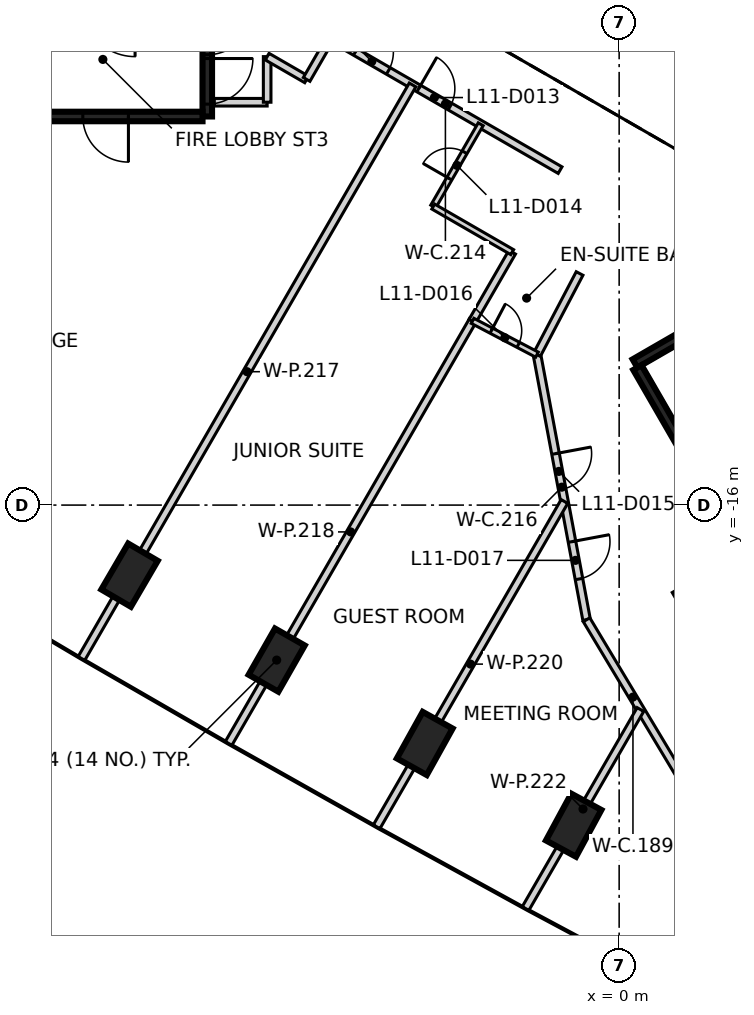
"""IFC4 building model, lengths in metres.
Left out: names, types, materials, properties, quantities, classifications, styles, units other than length and angle.
Written with IfcOpenShell. Run it as: python <this file> out.ifc"""

import sys

from ifc_helpers import new_model, si_unit, direction, frame, frame_2d, origin, origin_2d, place, context, subcontext, project, spatial, rectangle, extrude, element, fill, save


model = new_model("IFC4")
c1 = context("Model", 3, precision=1e-05, world=origin(), true_north=direction((0.0, 1.0)))
c2 = subcontext(c1, "Body", "Model", "MODEL_VIEW")
j1 = project(units=[si_unit("LENGTHUNIT", "METRE"), si_unit("PLANEANGLEUNIT", "RADIAN")], contexts=[c1])
p1 = place(None, origin())
s1 = spatial("IfcSite", under=j1, at=p1, CompositionType="ELEMENT")
p2 = place(p1, origin())
s2 = spatial("IfcBuilding", under=s1, at=p2, CompositionType="ELEMENT")
p3 = place(p2, frame((0.0, 0.0, 53.0)))
s3 = spatial("IfcBuildingStorey", under=s2, at=p3, CompositionType="ELEMENT", Elevation=53.0)
for number, where, z_axis, x_axis in (
    (1, (-12.883, -17.844, -0.475), (0.0, 0.0, 1.0), (0.505, 0.863, 0.0)),
    (2, (-9.011, -20.079, -0.475), (0.0, 0.0, 1.0), (0.495, 0.869, 0.0)),
    (3, (-5.116, -22.272, -0.475), (0.0, 0.0, 1.0), (0.486, 0.874, 0.0)),
    (4, (-1.197, -24.423, -0.475), (0.0, 0.0, 1.0), (0.476, 0.879, 0.0)),
):
    element("IfcColumn", number, at=place(p3, frame(where, z_axis=z_axis, x_axis=x_axis)), inside=s3, PredefinedType="COLUMN", context=c2, shape_type="SweptSolid", body=[
        extrude(rectangle(XDim=1.4, YDim=0.9, at=origin_2d()), origin(), (0.0, 0.0, 1.0), 3.6),
    ])
p4 = place(p3, frame((-10.837, 5.775, 0.0), z_axis=(0.0, 0.0, 1.0), x_axis=(0.0, -1.0, 0.0)))
e5 = element("IfcWall", 5, at=p4, inside=s3, PredefinedType="SHEAR", context=c2, shape_type="SweptSolid", body=[
    extrude(rectangle(XDim=11.55, YDim=0.25, at=frame_2d((5.775, 0.0))), origin(), (0.0, 0.0, 1.0), 3.125),
])
p5 = place(p4, frame((10.025, 0.0, 0.0)))
e6 = element("IfcOpeningElement", 6, at=p5, cuts=e5, PredefinedType="OPENING", context=c2, shape_type="SweptSolid", body=[
    extrude(rectangle(XDim=1.2, YDim=2.1, at=frame_2d((0.6, 1.05))), frame((0.0, 0.135, 0.0), z_axis=(0.0, -1.0, 0.0), x_axis=(1.0, 0.0, 0.0)), (0.0, 0.0, 1.0), 0.27),
])
p6 = place(p4, frame((8.725, 0.0, 0.0)))
e7 = element("IfcOpeningElement", 7, at=p6, cuts=e5, PredefinedType="OPENING", context=c2, shape_type="SweptSolid", body=[
    extrude(rectangle(XDim=1.2, YDim=2.1, at=frame_2d((0.6, 1.05))), frame((0.0, 0.135, 0.0), z_axis=(0.0, -1.0, 0.0), x_axis=(1.0, 0.0, 0.0)), (0.0, 0.0, 1.0), 0.27),
])
p7 = place(p3, frame((-10.963, -5.775, 0.0), z_axis=(0.0, 0.0, 1.0), x_axis=(-1.0, 0.0, 0.0)))
e8 = element("IfcWall", 8, at=p7, inside=s3, PredefinedType="SHEAR", context=c2, shape_type="SweptSolid", body=[
    extrude(rectangle(XDim=5.225, YDim=0.25, at=frame_2d((2.612, 0.0))), origin(), (0.0, 0.0, 1.0), 3.125),
])
p8 = place(p7, frame((1.95, 0.0, 0.0)))
e9 = element("IfcOpeningElement", 9, at=p8, cuts=e8, PredefinedType="OPENING", context=c2, shape_type="SweptSolid", body=[
    extrude(rectangle(XDim=1.2, YDim=2.1, at=frame_2d((0.6, 1.05))), frame((0.0, 0.135, 0.0), z_axis=(0.0, -1.0, 0.0), x_axis=(1.0, 0.0, 0.0)), (0.0, 0.0, 1.0), 0.27),
])
p9 = place(p3, frame((0.417, -12.273, 0.0), z_axis=(0.0, 0.0, 1.0), x_axis=(0.866021906294, 0.500006057782, 0.0)))
e10 = element("IfcWall", 10, at=p9, inside=s3, PredefinedType="SHEAR", context=c2, shape_type="SweptSolid", body=[
    extrude(rectangle(XDim=11.55, YDim=0.25, at=frame_2d((5.775, 0.0))), origin(), (0.0, 0.0, 1.0), 3.125),
])
p10 = place(p9, frame((10.025, 0.0, 0.0)))
e11 = element("IfcOpeningElement", 11, at=p10, cuts=e10, PredefinedType="OPENING", context=c2, shape_type="SweptSolid", body=[
    extrude(rectangle(XDim=1.2, YDim=2.1, at=frame_2d((0.6, 1.05))), frame((0.0, 0.135, 0.0), z_axis=(0.0, -1.0, 0.0), x_axis=(1.0, 0.0, 0.0)), (0.0, 0.0, 1.0), 0.27),
])
p11 = place(p9, frame((8.725, 0.0, 0.0)))
e12 = element("IfcOpeningElement", 12, at=p11, cuts=e10, PredefinedType="OPENING", context=c2, shape_type="SweptSolid", body=[
    extrude(rectangle(XDim=1.2, YDim=2.1, at=frame_2d((0.6, 1.05))), frame((0.0, 0.135, 0.0), z_axis=(0.0, -1.0, 0.0), x_axis=(1.0, 0.0, 0.0)), (0.0, 0.0, 1.0), 0.27),
])
p12 = place(p3, frame((3.235, -17.153, 0.0), z_axis=(0.0, 0.0, 1.0), x_axis=(-0.500008851346, 0.866020293397, 0.0)))
e13 = element("IfcWall", 13, at=p12, inside=s3, PredefinedType="SHEAR", context=c2, shape_type="SweptSolid", body=[
    extrude(rectangle(XDim=5.51, YDim=0.25, at=frame_2d((2.755, 0.0))), origin(), (0.0, 0.0, 1.0), 3.125),
])
p13 = place(p3, frame((-10.652, -5.4, 0.0), z_axis=(0.0, 0.0, 1.0), x_axis=(1.0, 0.0, 0.0)))
e14 = element("IfcWall", 14, at=p13, inside=s3, PredefinedType="PARTITIONING", context=c2, shape_type="SweptSolid", body=[
    extrude(rectangle(XDim=1.39, YDim=0.2, at=frame_2d((0.695, 0.0))), origin(), (0.0, 0.0, 1.0), 3.125),
])
for number, where, z_axis, x_axis in (
    (15, (-9.262, -5.4, 0.0), (0.0, 0.0, 1.0), (0.0, 1.0, 0.0)),
    (16, (-9.262, -4.2, 0.0), (0.0, 0.0, 1.0), (0.866, -0.5, 0.0)),
):
    element("IfcWall", number, at=place(p3, frame(where, z_axis=z_axis, x_axis=x_axis)), inside=s3, PredefinedType="PARTITIONING", context=c2, shape_type="SweptSolid", body=[
        extrude(rectangle(XDim=1.2, YDim=0.2, at=frame_2d((0.6, 0.0))), origin(), (0.0, 0.0, 1.0), 3.125),
    ])
p14 = place(p3, frame((-8.223, -4.8, 0.0), z_axis=(0.0, 0.0, 1.0), x_axis=(0.499866914522, 0.866102227088, 0.0)))
e17 = element("IfcWall", 17, at=p14, inside=s3, PredefinedType="PARTITIONING", context=c2, shape_type="SweptSolid", body=[
    extrude(rectangle(XDim=1.268, YDim=0.2, at=frame_2d((0.634, 0.0))), origin(), (0.0, 0.0, 1.0), 3.125),
])
p15 = place(p3, frame((-7.589, -3.702, 0.0), z_axis=(0.0, 0.0, 1.0), x_axis=(0.865994210678, -0.500054024153, 0.0)))
e18 = element("IfcWall", 18, at=p15, inside=s3, PredefinedType="PARTITIONING", context=c2, shape_type="SweptSolid", body=[
    extrude(rectangle(XDim=6.969, YDim=0.2, at=frame_2d((3.484, 0.0))), origin(), (0.0, 0.0, 1.0), 3.125),
])
p16 = place(p15, frame((0.749, 0.0, 0.0)))
e19 = element("IfcOpeningElement", 19, at=p16, cuts=e18, PredefinedType="OPENING", context=c2, shape_type="SweptSolid", body=[
    extrude(rectangle(XDim=1.0, YDim=2.1, at=frame_2d((0.5, 1.05))), frame((0.0, 0.11, 0.0), z_axis=(0.0, -1.0, 0.0), x_axis=(1.0, 0.0, 0.0)), (0.0, 0.0, 1.0), 0.22),
])
p17 = place(p15, frame((2.674, 0.0, 0.0)))
e20 = element("IfcOpeningElement", 20, at=p17, cuts=e18, PredefinedType="OPENING", context=c2, shape_type="SweptSolid", body=[
    extrude(rectangle(XDim=0.95, YDim=2.1, at=frame_2d((0.475, 1.05))), frame((0.0, 0.11, 0.0), z_axis=(0.0, -1.0, 0.0), x_axis=(1.0, 0.0, 0.0)), (0.0, 0.0, 1.0), 0.22),
])
p18 = place(p3, frame((-2.162, -12.042, 0.0), z_axis=(0.0, 0.0, 1.0), x_axis=(0.183949825522, -0.982935634561, 0.0)))
e21 = element("IfcWall", 21, at=p18, inside=s3, PredefinedType="PARTITIONING", context=c2, shape_type="SweptSolid", body=[
    extrude(rectangle(XDim=7.094, YDim=0.2, at=frame_2d((3.547, 0.0))), origin(), (0.0, 0.0, 1.0), 3.125),
])
p19 = place(p18, frame((2.65, 0.0, 0.0)))
e22 = element("IfcOpeningElement", 22, at=p19, cuts=e21, PredefinedType="OPENING", context=c2, shape_type="SweptSolid", body=[
    extrude(rectangle(XDim=0.95, YDim=2.1, at=frame_2d((0.475, 1.05))), frame((0.0, 0.11, 0.0), z_axis=(0.0, -1.0, 0.0), x_axis=(1.0, 0.0, 0.0)), (0.0, 0.0, 1.0), 0.22),
])
p20 = place(p18, frame((5.006, 0.0, 0.0)))
e23 = element("IfcOpeningElement", 23, at=p20, cuts=e21, PredefinedType="OPENING", context=c2, shape_type="SweptSolid", body=[
    extrude(rectangle(XDim=1.0, YDim=2.1, at=frame_2d((0.5, 1.05))), frame((0.0, 0.11, 0.0), z_axis=(0.0, -1.0, 0.0), x_axis=(1.0, 0.0, 0.0)), (0.0, 0.0, 1.0), 0.22),
])
p21 = place(p3, frame((-2.162, -12.041, 0.0), z_axis=(0.0, 0.0, 1.0), x_axis=(0.464903343334, 0.885361441083, 0.0)))
e24 = element("IfcWall", 24, at=p21, inside=s3, PredefinedType="PARTITIONING", context=c2, shape_type="SweptSolid", body=[
    extrude(rectangle(XDim=2.411, YDim=0.2, at=frame_2d((1.206, 0.0))), origin(), (0.0, 0.0, 1.0), 3.125),
])
p22 = place(p3, frame((-0.858, -19.017, 0.0), z_axis=(0.0, 0.0, 1.0), x_axis=(0.514647068805, -0.857402119528, 0.0)))
e25 = element("IfcWall", 25, at=p22, inside=s3, PredefinedType="PARTITIONING", context=c2, shape_type="SweptSolid", body=[
    extrude(rectangle(XDim=4.745, YDim=0.2, at=frame_2d((2.373, 0.0))), origin(), (0.0, 0.0, 1.0), 3.125),
])
p23 = place(p3, frame((-14.148, -20.035, 0.0), z_axis=(0.0, 0.0, 1.0), x_axis=(0.499978771293, 0.866037659837, 0.0)))
e26 = element("IfcWall", 26, at=p23, inside=s3, PredefinedType="PARTITIONING", context=c2, shape_type="SweptSolid", body=[
    extrude(rectangle(XDim=17.425, YDim=0.2, at=frame_2d((8.712, 0.0))), origin(), (0.0, 0.0, 1.0), 3.125),
])
p24 = place(p3, frame((-10.276, -22.271, 0.0), z_axis=(0.0, 0.0, 1.0), x_axis=(0.499984478165, 0.866034365135, 0.0)))
e27 = element("IfcWall", 27, at=p24, inside=s3, PredefinedType="PARTITIONING", context=c2, shape_type="SweptSolid", body=[
    extrude(rectangle(XDim=12.851, YDim=0.2, at=frame_2d((6.426, 0.0))), origin(), (0.0, 0.0, 1.0), 3.125),
])
p25 = place(p3, frame((-6.381, -24.464, 0.0), z_axis=(0.0, 0.0, 1.0), x_axis=(0.500007577232, 0.866021029023, 0.0)))
e28 = element("IfcWall", 28, at=p25, inside=s3, PredefinedType="PARTITIONING", context=c2, shape_type="SweptSolid", body=[
    extrude(rectangle(XDim=9.883, YDim=0.2, at=frame_2d((4.941, 0.0))), origin(), (0.0, 0.0, 1.0), 3.125),
])
p26 = place(p3, frame((-3.863, -11.163, 0.0), z_axis=(0.0, 0.0, 1.0), x_axis=(0.499779509621, 0.866152666545, 0.0)))
e29 = element("IfcWall", 29, at=p26, inside=s3, PredefinedType="PARTITIONING", context=c2, shape_type="SweptSolid", body=[
    extrude(rectangle(XDim=2.099, YDim=0.2, at=frame_2d((1.05, 0.0))), origin(), (0.0, 0.0, 1.0), 3.125),
])
p27 = place(p3, frame((-2.462, -26.615, 0.0), z_axis=(0.0, 0.0, 1.0), x_axis=(0.49992636536, 0.86606791259, 0.0)))
e30 = element("IfcWall", 30, at=p27, inside=s3, PredefinedType="PARTITIONING", context=c2, shape_type="SweptSolid", body=[
    extrude(rectangle(XDim=6.046, YDim=0.2, at=frame_2d((3.023, 0.0))), origin(), (0.0, 0.0, 1.0), 3.125),
])
p28 = place(p3, frame((-4.892, -8.145, 0.0), z_axis=(0.0, 0.0, 1.0), x_axis=(0.499711178953, 0.866192090491, 0.0)))
e31 = element("IfcWall", 31, at=p28, inside=s3, PredefinedType="PARTITIONING", context=c2, shape_type="SweptSolid", body=[
    extrude(rectangle(XDim=2.5, YDim=0.15, at=frame_2d((1.25, 0.0))), origin(), (0.0, 0.0, 1.0), 3.125),
])
p29 = place(p28, frame((0.85, 0.0, 0.0)))
e32 = element("IfcOpeningElement", 32, at=p29, cuts=e31, PredefinedType="OPENING", context=c2, shape_type="SweptSolid", body=[
    extrude(rectangle(XDim=0.8, YDim=2.1, at=frame_2d((0.4, 1.05))), frame((0.0, 0.085, 0.0), z_axis=(0.0, -1.0, 0.0), x_axis=(1.0, 0.0, 0.0)), (0.0, 0.0, 1.0), 0.17),
])
p30 = place(p3, frame((-4.892, -8.145, 0.0), z_axis=(0.0, 0.0, 1.0), x_axis=(0.865999212041, -0.500045362686, 0.0)))
e33 = element("IfcWall", 33, at=p30, inside=s3, PredefinedType="PARTITIONING", context=c2, shape_type="SweptSolid", body=[
    extrude(rectangle(XDim=2.4, YDim=0.15, at=frame_2d((1.2, 0.0))), origin(), (0.0, 0.0, 1.0), 3.125),
])
p31 = place(p3, frame((-3.857, -11.152, 0.0), z_axis=(0.0, 0.0, 1.0), x_axis=(0.885374281086, -0.464878890026, 0.0)))
e34 = element("IfcWall", 34, at=p31, inside=s3, PredefinedType="PARTITIONING", context=c2, shape_type="SweptSolid", body=[
    extrude(rectangle(XDim=1.914, YDim=0.15, at=frame_2d((0.957, 0.0))), origin(), (0.0, 0.0, 1.0), 3.125),
])
p32 = place(p31, frame((0.557, 0.0, 0.0)))
e35 = element("IfcOpeningElement", 35, at=p32, cuts=e34, PredefinedType="OPENING", context=c2, shape_type="SweptSolid", body=[
    extrude(rectangle(XDim=0.8, YDim=2.1, at=frame_2d((0.4, 1.05))), frame((0.0, 0.085, 0.0), z_axis=(0.0, -1.0, 0.0), x_axis=(1.0, 0.0, 0.0)), (0.0, 0.0, 1.0), 0.17),
])
p33 = place(p5, origin())
e36 = element("IfcDoor", 36, at=p33, inside=s3, OperationType="SINGLE_SWING_LEFT", PredefinedType="DOOR", context=c2, shape_type="SweptSolid", body=[
    extrude(rectangle(XDim=1.2, YDim=2.1, at=frame_2d((0.6, 1.05))), frame((0.0, 0.025, 0.0), z_axis=(0.0, -1.0, 0.0), x_axis=(1.0, 0.0, 0.0)), (0.0, 0.0, 1.0), 0.05),
])
fill(e6, e36)
p34 = place(p6, origin())
e37 = element("IfcDoor", 37, at=p34, inside=s3, OperationType="SINGLE_SWING_RIGHT", PredefinedType="DOOR", context=c2, shape_type="SweptSolid", body=[
    extrude(rectangle(XDim=1.2, YDim=2.1, at=frame_2d((0.6, 1.05))), frame((0.0, 0.025, 0.0), z_axis=(0.0, -1.0, 0.0), x_axis=(1.0, 0.0, 0.0)), (0.0, 0.0, 1.0), 0.05),
])
fill(e7, e37)
p35 = place(p8, origin())
e38 = element("IfcDoor", 38, at=p35, inside=s3, OperationType="SINGLE_SWING_RIGHT", PredefinedType="DOOR", context=c2, shape_type="SweptSolid", body=[
    extrude(rectangle(XDim=1.2, YDim=2.1, at=frame_2d((0.6, 1.05))), frame((0.0, 0.025, 0.0), z_axis=(0.0, -1.0, 0.0), x_axis=(1.0, 0.0, 0.0)), (0.0, 0.0, 1.0), 0.05),
])
fill(e9, e38)
p36 = place(p16, frame((1.0, 0.0, 0.0), z_axis=(0.0, 0.0, 1.0), x_axis=(-1.0, 0.0, 0.0)))
e39 = element("IfcDoor", 39, at=p36, inside=s3, OperationType="SINGLE_SWING_LEFT", PredefinedType="DOOR", context=c2, shape_type="SweptSolid", body=[
    extrude(rectangle(XDim=1.0, YDim=2.1, at=frame_2d((0.5, 1.05))), frame((0.0, 0.025, 0.0), z_axis=(0.0, -1.0, 0.0), x_axis=(1.0, 0.0, 0.0)), (0.0, 0.0, 1.0), 0.05),
])
fill(e19, e39)
p37 = place(p17, frame((0.95, 0.0, 0.0), z_axis=(0.0, 0.0, 1.0), x_axis=(-1.0, 0.0, 0.0)))
e40 = element("IfcDoor", 40, at=p37, inside=s3, OperationType="SINGLE_SWING_LEFT", PredefinedType="DOOR", context=c2, shape_type="SweptSolid", body=[
    extrude(rectangle(XDim=0.95, YDim=2.1, at=frame_2d((0.475, 1.05))), frame((0.0, 0.025, 0.0), z_axis=(0.0, -1.0, 0.0), x_axis=(1.0, 0.0, 0.0)), (0.0, 0.0, 1.0), 0.05),
])
fill(e20, e40)
p38 = place(p29, frame((0.8, 0.0, 0.0), z_axis=(0.0, 0.0, 1.0), x_axis=(-1.0, 0.0, 0.0)))
e41 = element("IfcDoor", 41, at=p38, inside=s3, OperationType="SINGLE_SWING_LEFT", PredefinedType="DOOR", context=c2, shape_type="SweptSolid", body=[
    extrude(rectangle(XDim=0.8, YDim=2.1, at=frame_2d((0.4, 1.05))), frame((0.0, 0.025, 0.0), z_axis=(0.0, -1.0, 0.0), x_axis=(1.0, 0.0, 0.0)), (0.0, 0.0, 1.0), 0.05),
])
fill(e32, e41)
p39 = place(p19, frame((0.95, 0.0, 0.0), z_axis=(0.0, 0.0, 1.0), x_axis=(-1.0, 0.0, 0.0)))
e42 = element("IfcDoor", 42, at=p39, inside=s3, OperationType="SINGLE_SWING_LEFT", PredefinedType="DOOR", context=c2, shape_type="SweptSolid", body=[
    extrude(rectangle(XDim=0.95, YDim=2.1, at=frame_2d((0.475, 1.05))), frame((0.0, 0.025, 0.0), z_axis=(0.0, -1.0, 0.0), x_axis=(1.0, 0.0, 0.0)), (0.0, 0.0, 1.0), 0.05),
])
fill(e22, e42)
p40 = place(p32, frame((0.8, 0.0, 0.0), z_axis=(0.0, 0.0, 1.0), x_axis=(-1.0, 0.0, 0.0)))
e43 = element("IfcDoor", 43, at=p40, inside=s3, OperationType="SINGLE_SWING_LEFT", PredefinedType="DOOR", context=c2, shape_type="SweptSolid", body=[
    extrude(rectangle(XDim=0.8, YDim=2.1, at=frame_2d((0.4, 1.05))), frame((0.0, 0.025, 0.0), z_axis=(0.0, -1.0, 0.0), x_axis=(1.0, 0.0, 0.0)), (0.0, 0.0, 1.0), 0.05),
])
fill(e35, e43)
p41 = place(p20, frame((1.0, 0.0, 0.0), z_axis=(0.0, 0.0, 1.0), x_axis=(-1.0, 0.0, 0.0)))
e44 = element("IfcDoor", 44, at=p41, inside=s3, OperationType="SINGLE_SWING_LEFT", PredefinedType="DOOR", context=c2, shape_type="SweptSolid", body=[
    extrude(rectangle(XDim=1.0, YDim=2.1, at=frame_2d((0.5, 1.05))), frame((0.0, 0.025, 0.0), z_axis=(0.0, -1.0, 0.0), x_axis=(1.0, 0.0, 0.0)), (0.0, 0.0, 1.0), 0.05),
])
fill(e23, e44)
save(model, sys.argv[1])
